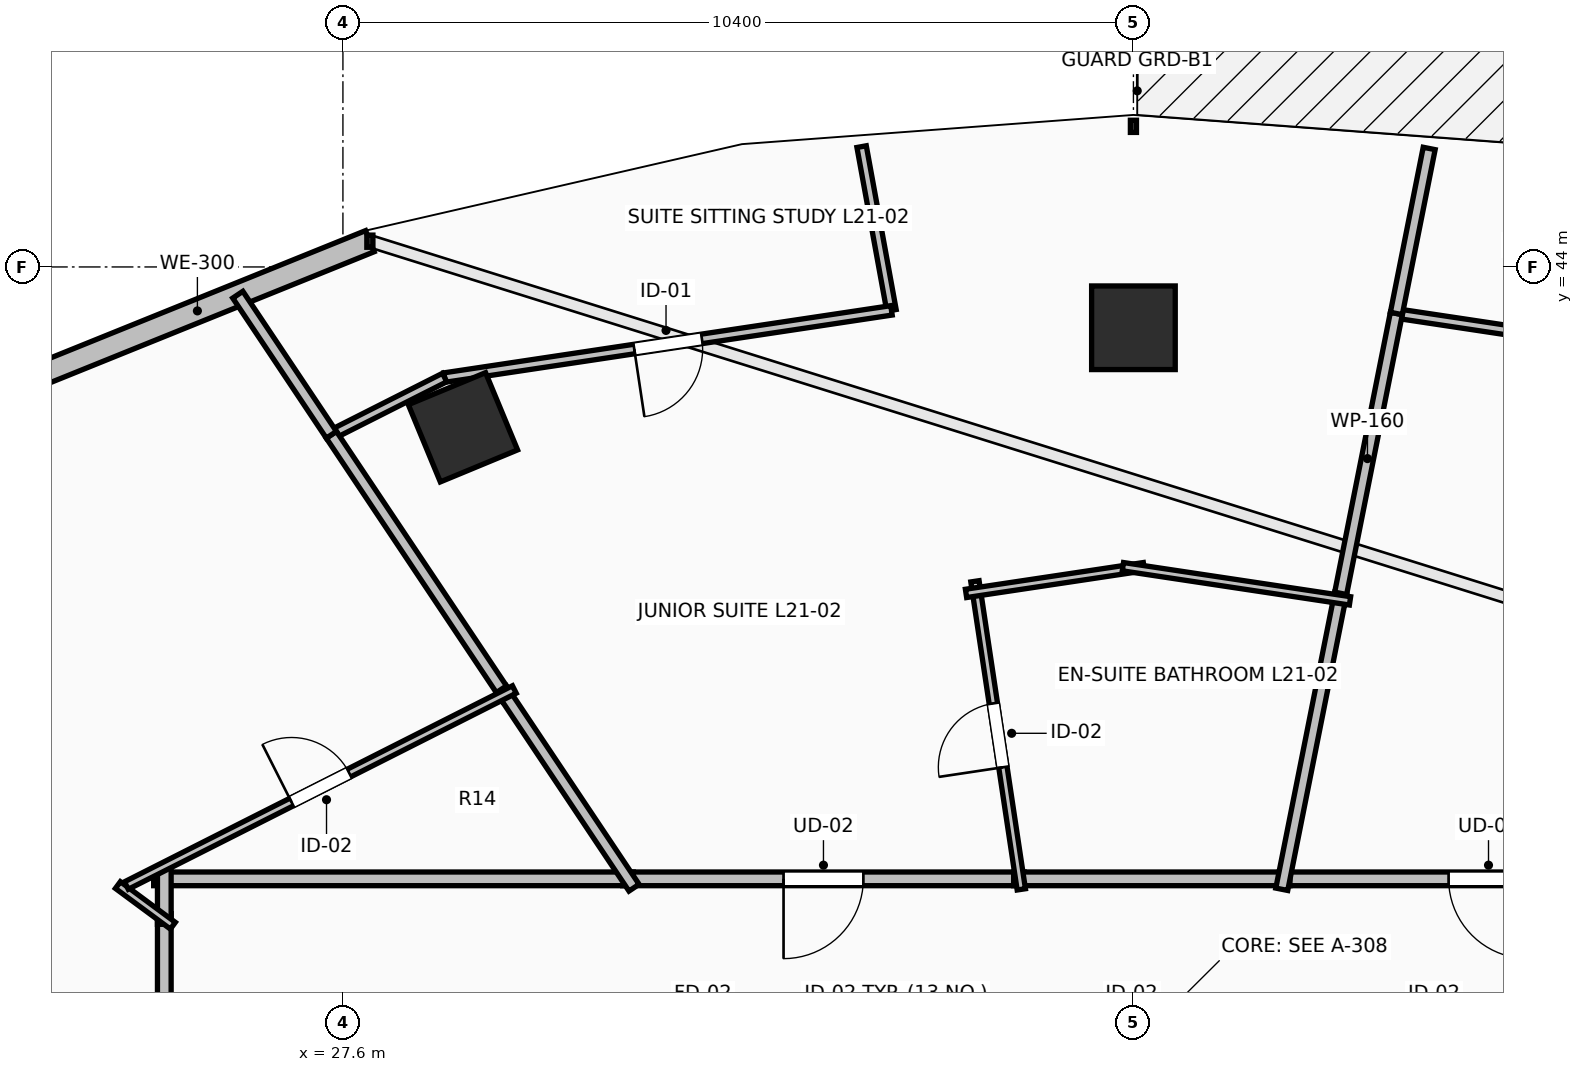
"""IFC4 building model, lengths in metres.
Left out: names, types, materials, properties, quantities, classifications, styles, units other than length and angle.
Written with IfcOpenShell. Run it as: python <this file> out.ifc"""

import sys

from ifc_helpers import new_model, si_unit, direction, frame, frame_2d, origin, origin_2d, place, context, subcontext, project, spatial, rectangle, extrude, element, fill, save


model = new_model("IFC4")
c1 = context("Model", 3, precision=1e-05, world=origin(), true_north=direction((0.0, 1.0)))
c2 = subcontext(c1, "Body", "Model", "MODEL_VIEW")
j1 = project(units=[si_unit("LENGTHUNIT", "METRE"), si_unit("PLANEANGLEUNIT", "RADIAN")], contexts=[c1])
p1 = place(None, origin())
s1 = spatial("IfcSite", under=j1, at=p1, CompositionType="ELEMENT")
p2 = place(p1, origin())
s2 = spatial("IfcBuilding", under=s1, at=p2, CompositionType="ELEMENT")
p3 = place(p2, frame((0.0, 0.0, 82.3)))
s3 = spatial("IfcBuildingStorey", under=s2, at=p3, CompositionType="ELEMENT", Elevation=82.3)
for number, where, z_axis, x_axis in (
    (1, (38.0, 43.2, 0.0), (0.0, 0.0, 1.0), (0.0, 1.0, 0.0)),
    (2, (29.179, 41.891, 0.0), (0.0, 0.0, 1.0), (-0.383, 0.924, 0.0)),
):
    element("IfcColumn", number, at=place(p3, frame(where, z_axis=z_axis, x_axis=x_axis)), inside=s3, PredefinedType="COLUMN", context=c2, shape_type="SweptSolid", body=[
        extrude(rectangle(XDim=1.1, YDim=1.1, at=origin_2d()), origin(), (0.0, 0.0, 1.0), 3.5),
    ])
p4 = place(p3, frame((27.955, 44.339, 0.0), z_axis=(0.0, 0.0, 1.0), x_axis=(-0.927122233109, -0.374759075775, 0.0)))
e3 = element("IfcWall", 3, at=p4, inside=s3, PredefinedType="STANDARD", context=c2, shape_type="SweptSolid", body=[
    extrude(rectangle(XDim=4.895, YDim=0.3, at=frame_2d((2.448, 0.0))), origin(), (0.0, 0.0, 1.0), 3.24),
])
p5 = place(p3, frame((45.424, 35.95, 0.0), z_axis=(0.0, 0.0, 1.0), x_axis=(-1.0, 0.0, 0.0)))
e4 = element("IfcWall", 4, at=p5, inside=s3, PredefinedType="PARTITIONING", context=c2, shape_type="SweptSolid", body=[
    extrude(rectangle(XDim=5.505, YDim=0.18, at=frame_2d((2.752, 0.0))), origin(), (0.0, 0.0, 1.0), 2.922),
])
p6 = place(p5, frame((2.228, 0.0, 0.0)))
e5 = element("IfcOpeningElement", 5, at=p6, cuts=e4, PredefinedType="OPENING", context=c2, shape_type="SweptSolid", body=[
    extrude(rectangle(XDim=1.05, YDim=2.2, at=frame_2d((0.525, 1.1))), frame((0.0, 0.105, 0.0), z_axis=(0.0, -1.0, 0.0), x_axis=(1.0, 0.0, 0.0)), (0.0, 0.0, 1.0), 0.21),
])
p7 = place(p3, frame((36.564, 35.95, 0.0), z_axis=(0.0, 0.0, 1.0), x_axis=(-1.0, 0.0, 0.0)))
e6 = element("IfcWall", 6, at=p7, inside=s3, PredefinedType="PARTITIONING", context=c2, shape_type="SweptSolid", body=[
    extrude(rectangle(XDim=5.284, YDim=0.18, at=frame_2d((2.642, 0.0))), origin(), (0.0, 0.0, 1.0), 3.24),
])
p8 = place(p7, frame((2.117, 0.0, 0.0)))
e7 = element("IfcOpeningElement", 7, at=p8, cuts=e6, PredefinedType="OPENING", context=c2, shape_type="SweptSolid", body=[
    extrude(rectangle(XDim=1.05, YDim=2.2, at=frame_2d((0.525, 1.1))), frame((0.0, 0.105, 0.0), z_axis=(0.0, -1.0, 0.0), x_axis=(1.0, 0.0, 0.0)), (0.0, 0.0, 1.0), 0.21),
])
p9 = place(p3, frame((40.059, 35.95, 0.0), z_axis=(0.0, 0.0, 1.0), x_axis=(-1.0, 0.0, 0.0)))
e8 = element("IfcWall", 8, at=p9, inside=s3, PredefinedType="PARTITIONING", context=c2, shape_type="SweptSolid", body=[
    extrude(rectangle(XDim=3.635, YDim=0.18, at=frame_2d((1.817, 0.0))), origin(), (0.0, 0.0, 1.0), 3.24),
])
p10 = place(p3, frame((25.25, 35.492, 0.0), z_axis=(0.0, 0.0, 1.0), x_axis=(0.0, -1.0, 0.0)))
e9 = element("IfcWall", 9, at=p10, inside=s3, PredefinedType="PARTITIONING", context=c2, shape_type="SweptSolid", body=[
    extrude(rectangle(XDim=7.016, YDim=0.18, at=frame_2d((3.508, 0.0))), origin(), (0.0, 0.0, 1.0), 2.432),
])
p11 = place(p10, frame((2.983, 0.0, 0.0)))
e10 = element("IfcOpeningElement", 10, at=p11, cuts=e9, PredefinedType="OPENING", context=c2, shape_type="SweptSolid", body=[
    extrude(rectangle(XDim=1.05, YDim=2.2, at=frame_2d((0.525, 1.1))), frame((0.0, 0.105, 0.0), z_axis=(0.0, -1.0, 0.0), x_axis=(1.0, 0.0, 0.0)), (0.0, 0.0, 1.0), 0.21),
])
p12 = place(p3, frame((31.42, 35.95, 0.0), z_axis=(0.0, 0.0, 1.0), x_axis=(-1.0, 0.0, 0.0)))
e11 = element("IfcWall", 11, at=p12, inside=s3, PredefinedType="PARTITIONING", context=c2, shape_type="SweptSolid", body=[
    extrude(rectangle(XDim=6.31, YDim=0.18, at=frame_2d((3.155, 0.0))), origin(), (0.0, 0.0, 1.0), 2.432),
])
p13 = place(p3, frame((25.25, 36.09, 0.0), z_axis=(0.0, 0.0, 1.0), x_axis=(0.0, -1.0, 0.0)))
e12 = element("IfcWall", 12, at=p13, inside=s3, PredefinedType="PARTITIONING", context=c2, shape_type="SweptSolid", body=[
    extrude(rectangle(XDim=0.738, YDim=0.18, at=frame_2d((0.369, 0.0))), origin(), (0.0, 0.0, 1.0), 3.24),
])
p14 = place(p3, frame((47.062, 42.545, 0.0), z_axis=(0.0, 0.0, 1.0), x_axis=(-0.988869883596, 0.148782906669, 0.0)))
e13 = element("IfcWall", 13, at=p14, inside=s3, PredefinedType="PARTITIONING", context=c2, shape_type="SweptSolid", body=[
    extrude(rectangle(XDim=5.666, YDim=0.125, at=frame_2d((2.833, 0.0))), origin(), (0.0, 0.0, 1.0), 3.24),
])
p15 = place(p14, frame((2.383, 0.0, 0.0)))
e14 = element("IfcOpeningElement", 14, at=p15, cuts=e13, PredefinedType="OPENING", context=c2, shape_type="SweptSolid", body=[
    extrude(rectangle(XDim=0.9, YDim=2.1, at=frame_2d((0.45, 1.05))), frame((0.0, 0.077, 0.0), z_axis=(0.0, -1.0, 0.0), x_axis=(1.0, 0.0, 0.0)), (0.0, 0.0, 1.0), 0.155),
])
p16 = place(p3, frame((41.459, 43.388, 0.0), z_axis=(0.0, 0.0, 1.0), x_axis=(-0.195187593062, -0.980765926975, 0.0)))
e15 = element("IfcWall", 15, at=p16, inside=s3, PredefinedType="PARTITIONING", context=c2, shape_type="SweptSolid", body=[
    extrude(rectangle(XDim=3.894, YDim=0.16, at=frame_2d((1.947, 0.0))), origin(), (0.0, 0.0, 1.0), 2.677),
])
p17 = place(p3, frame((40.727, 39.706, 0.0), z_axis=(0.0, 0.0, 1.0), x_axis=(-0.195252736913, -0.980752960091, 0.0)))
e16 = element("IfcWall", 16, at=p17, inside=s3, PredefinedType="PARTITIONING", context=c2, shape_type="SweptSolid", body=[
    extrude(rectangle(XDim=3.97, YDim=0.16, at=frame_2d((1.985, 0.0))), origin(), (0.0, 0.0, 1.0), 2.874),
])
p18 = place(p3, frame((41.891, 45.559, 0.0), z_axis=(0.0, 0.0, 1.0), x_axis=(-0.195204079936, -0.980762645688, 0.0)))
e17 = element("IfcWall", 17, at=p18, inside=s3, PredefinedType="PARTITIONING", context=c2, shape_type="SweptSolid", body=[
    extrude(rectangle(XDim=2.214, YDim=0.16, at=frame_2d((1.107, 0.0))), origin(), (0.0, 0.0, 1.0), 3.24),
])
p19 = place(p3, frame((36.525, 35.812, 0.0), z_axis=(0.0, 0.0, 1.0), x_axis=(-0.148739497936, 0.988876413792, 0.0)))
e18 = element("IfcWall", 18, at=p19, inside=s3, PredefinedType="PARTITIONING", context=c2, shape_type="SweptSolid", body=[
    extrude(rectangle(XDim=4.099, YDim=0.11, at=frame_2d((2.049, 0.0))), origin(), (0.0, 0.0, 1.0), 2.874),
])
p20 = place(p19, frame((1.624, 0.0, 0.0)))
e19 = element("IfcOpeningElement", 19, at=p20, cuts=e18, PredefinedType="OPENING", context=c2, shape_type="SweptSolid", body=[
    extrude(rectangle(XDim=0.85, YDim=2.1, at=frame_2d((0.425, 1.05))), frame((0.0, 0.07, 0.0), z_axis=(0.0, -1.0, 0.0), x_axis=(1.0, 0.0, 0.0)), (0.0, 0.0, 1.0), 0.14),
])
p21 = place(p3, frame((35.798, 39.705, 0.0), z_axis=(0.0, 0.0, 1.0), x_axis=(0.988893947493, 0.148622880511, 0.0)))
e20 = element("IfcWall", 20, at=p21, inside=s3, PredefinedType="PARTITIONING", context=c2, shape_type="SweptSolid", body=[
    extrude(rectangle(XDim=2.367, YDim=0.11, at=frame_2d((1.184, 0.0))), origin(), (0.0, 0.0, 1.0), 2.874),
])
p22 = place(p3, frame((37.862, 40.057, 0.0), z_axis=(0.0, 0.0, 1.0), x_axis=(0.988861549405, -0.148838288446, 0.0)))
e21 = element("IfcWall", 21, at=p22, inside=s3, PredefinedType="PARTITIONING", context=c2, shape_type="SweptSolid", body=[
    extrude(rectangle(XDim=3.021, YDim=0.11, at=frame_2d((1.511, 0.0))), origin(), (0.0, 0.0, 1.0), 3.24),
])
p23 = place(p3, frame((34.424, 45.583, 0.0), z_axis=(0.0, 0.0, 1.0), x_axis=(0.179405454878, -0.983775219631, 0.0)))
e22 = element("IfcWall", 22, at=p23, inside=s3, PredefinedType="PARTITIONING", context=c2, shape_type="SweptSolid", body=[
    extrude(rectangle(XDim=2.19, YDim=0.125, at=frame_2d((1.095, 0.0))), origin(), (0.0, 0.0, 1.0), 3.24),
])
p24 = place(p3, frame((34.817, 43.429, 0.0), z_axis=(0.0, 0.0, 1.0), x_axis=(-0.988882066939, -0.14870190882, 0.0)))
e23 = element("IfcWall", 23, at=p24, inside=s3, PredefinedType="PARTITIONING", context=c2, shape_type="SweptSolid", body=[
    extrude(rectangle(XDim=5.945, YDim=0.125, at=frame_2d((2.973, 0.0))), origin(), (0.0, 0.0, 1.0), 3.24),
])
p25 = place(p24, frame((2.522, 0.0, 0.0)))
e24 = element("IfcOpeningElement", 24, at=p25, cuts=e23, PredefinedType="OPENING", context=c2, shape_type="SweptSolid", body=[
    extrude(rectangle(XDim=0.9, YDim=2.1, at=frame_2d((0.45, 1.05))), frame((0.0, 0.077, 0.0), z_axis=(0.0, -1.0, 0.0), x_axis=(1.0, 0.0, 0.0)), (0.0, 0.0, 1.0), 0.155),
])
p26 = place(p3, frame((28.938, 42.545, 0.0), z_axis=(0.0, 0.0, 1.0), x_axis=(-0.892517956507, -0.451011859392, 0.0)))
e25 = element("IfcWall", 25, at=p26, inside=s3, PredefinedType="PARTITIONING", context=c2, shape_type="SweptSolid", body=[
    extrude(rectangle(XDim=1.669, YDim=0.125, at=frame_2d((0.835, 0.0))), origin(), (0.0, 0.0, 1.0), 3.24),
])
p27 = place(p3, frame((27.448, 41.792, 0.0), z_axis=(0.0, 0.0, 1.0), x_axis=(0.555619383998, -0.831436768567, 0.0)))
e26 = element("IfcWall", 26, at=p27, inside=s3, PredefinedType="PARTITIONING", context=c2, shape_type="SweptSolid", body=[
    extrude(rectangle(XDim=4.167, YDim=0.16, at=frame_2d((2.083, 0.0))), origin(), (0.0, 0.0, 1.0), 2.432),
])
p28 = place(p3, frame((29.685, 38.444, 0.0), z_axis=(0.0, 0.0, 1.0), x_axis=(0.555596981897, -0.831451738652, 0.0)))
e27 = element("IfcWall", 27, at=p28, inside=s3, PredefinedType="PARTITIONING", context=c2, shape_type="SweptSolid", body=[
    extrude(rectangle(XDim=3.14, YDim=0.16, at=frame_2d((1.57, 0.0))), origin(), (0.0, 0.0, 1.0), 2.432),
])
p29 = place(p3, frame((26.217, 43.635, 0.0), z_axis=(0.0, 0.0, 1.0), x_axis=(0.555411777185, -0.831575467269, 0.0)))
e28 = element("IfcWall", 28, at=p29, inside=s3, PredefinedType="PARTITIONING", context=c2, shape_type="SweptSolid", body=[
    extrude(rectangle(XDim=2.216, YDim=0.16, at=frame_2d((1.108, 0.0))), origin(), (0.0, 0.0, 1.0), 3.24),
])
p30 = place(p3, frame((25.363, 35.334, 0.0), z_axis=(0.0, 0.0, 1.0), x_axis=(-0.804215638238, 0.594337620561, 0.0)))
e29 = element("IfcWall", 29, at=p30, inside=s3, PredefinedType="PARTITIONING", context=c2, shape_type="SweptSolid", body=[
    extrude(rectangle(XDim=0.899, YDim=0.11, at=frame_2d((0.45, 0.0))), origin(), (0.0, 0.0, 1.0), 2.432),
])
p31 = place(p3, frame((24.751, 35.862, 0.0), z_axis=(0.0, 0.0, 1.0), x_axis=(0.892506436774, 0.451034655339, 0.0)))
e30 = element("IfcWall", 30, at=p31, inside=s3, PredefinedType="PARTITIONING", context=c2, shape_type="SweptSolid", body=[
    extrude(rectangle(XDim=5.719, YDim=0.11, at=frame_2d((2.859, 0.0))), origin(), (0.0, 0.0, 1.0), 2.432),
])
p32 = place(p31, frame((2.434, 0.0, 0.0)))
e31 = element("IfcOpeningElement", 31, at=p32, cuts=e30, PredefinedType="OPENING", context=c2, shape_type="SweptSolid", body=[
    extrude(rectangle(XDim=0.85, YDim=2.1, at=frame_2d((0.425, 1.05))), frame((0.0, 0.07, 0.0), z_axis=(0.0, -1.0, 0.0), x_axis=(1.0, 0.0, 0.0)), (0.0, 0.0, 1.0), 0.14),
])
p33 = place(p6, origin())
e32 = element("IfcDoor", 32, at=p33, inside=s3, OperationType="SINGLE_SWING_LEFT", PredefinedType="DOOR", context=c2, shape_type="SweptSolid", body=[
    extrude(rectangle(XDim=1.05, YDim=2.2, at=frame_2d((0.525, 1.1))), frame((0.0, 0.025, 0.0), z_axis=(0.0, -1.0, 0.0), x_axis=(1.0, 0.0, 0.0)), (0.0, 0.0, 1.0), 0.05),
])
fill(e5, e32)
p34 = place(p8, origin())
e33 = element("IfcDoor", 33, at=p34, inside=s3, OperationType="SINGLE_SWING_RIGHT", PredefinedType="DOOR", context=c2, shape_type="SweptSolid", body=[
    extrude(rectangle(XDim=1.05, YDim=2.2, at=frame_2d((0.525, 1.1))), frame((0.0, 0.025, 0.0), z_axis=(0.0, -1.0, 0.0), x_axis=(1.0, 0.0, 0.0)), (0.0, 0.0, 1.0), 0.05),
])
fill(e7, e33)
p35 = place(p20, origin())
e34 = element("IfcDoor", 34, at=p35, inside=s3, OperationType="SINGLE_SWING_LEFT", PredefinedType="DOOR", context=c2, shape_type="SweptSolid", body=[
    extrude(rectangle(XDim=0.85, YDim=2.1, at=frame_2d((0.425, 1.05))), frame((0.0, 0.025, 0.0), z_axis=(0.0, -1.0, 0.0), x_axis=(1.0, 0.0, 0.0)), (0.0, 0.0, 1.0), 0.05),
])
fill(e19, e34)
p36 = place(p25, origin())
e35 = element("IfcDoor", 35, at=p36, inside=s3, OperationType="SINGLE_SWING_RIGHT", PredefinedType="DOOR", context=c2, shape_type="SweptSolid", body=[
    extrude(rectangle(XDim=0.9, YDim=2.1, at=frame_2d((0.45, 1.05))), frame((0.0, 0.025, 0.0), z_axis=(0.0, -1.0, 0.0), x_axis=(1.0, 0.0, 0.0)), (0.0, 0.0, 1.0), 0.05),
])
fill(e24, e35)
p37 = place(p32, origin())
e36 = element("IfcDoor", 36, at=p37, inside=s3, OperationType="SINGLE_SWING_LEFT", PredefinedType="DOOR", context=c2, shape_type="SweptSolid", body=[
    extrude(rectangle(XDim=0.85, YDim=2.1, at=frame_2d((0.425, 1.05))), frame((0.0, 0.025, 0.0), z_axis=(0.0, -1.0, 0.0), x_axis=(1.0, 0.0, 0.0)), (0.0, 0.0, 1.0), 0.05),
])
fill(e31, e36)
save(model, sys.argv[1])
